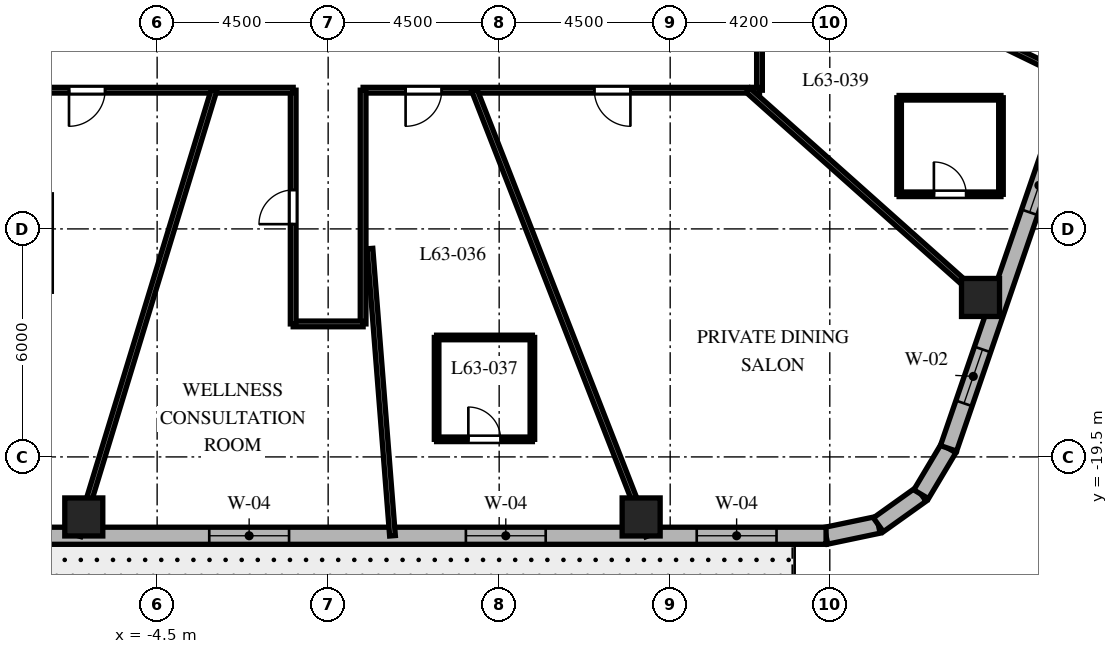
"""IFC4 building model, lengths in metres.
Left out: names, types, materials, properties, quantities, classifications, styles, units other than length and angle.
Written with IfcOpenShell. Run it as: python <this file> out.ifc"""

import sys

from ifc_helpers import new_model, si_unit, direction, frame, frame_2d, origin, origin_2d, place, context, subcontext, project, spatial, rectangle, extrude, element, fill, save


model = new_model("IFC4")
c1 = context("Model", 3, precision=1e-05, world=origin(), true_north=direction((0.0, 1.0)))
c2 = subcontext(c1, "Body", "Model", "MODEL_VIEW")
j1 = project(units=[si_unit("LENGTHUNIT", "METRE"), si_unit("PLANEANGLEUNIT", "RADIAN")], contexts=[c1])
p1 = place(None, origin())
s1 = spatial("IfcSite", under=j1, at=p1, CompositionType="ELEMENT")
p2 = place(p1, origin())
s2 = spatial("IfcBuilding", under=s1, at=p2, CompositionType="ELEMENT")
p3 = place(p2, frame((0.0, 0.0, 252.1)))
s3 = spatial("IfcBuildingStorey", under=s2, at=p3, CompositionType="ELEMENT", Elevation=252.1)
for number, where, z_axis, x_axis in (
    (1, (-6.43, -21.08, 0.0), (0.0, 0.0, 1.0), (1.0, 0.0, 0.0)),
    (2, (8.236, -21.08, 0.0), (0.0, 0.0, 1.0), (1.0, 0.0, 0.0)),
    (3, (17.166, -15.304, 0.0), (0.0, 0.0, 1.0), (1.0, 0.0, 0.0)),
):
    element("IfcColumn", number, at=place(p3, frame(where, z_axis=z_axis, x_axis=x_axis)), inside=s3, PredefinedType="COLUMN", context=c2, shape_type="SweptSolid", body=[
        extrude(rectangle(XDim=1.0, YDim=1.0, at=origin_2d()), origin(), (0.0, 0.0, 1.0), 3.8),
    ])
p4 = place(p3, frame((13.102, -21.575, 0.0), z_axis=(0.0, 0.0, 1.0), x_axis=(0.978757421505, 0.205021730188, 0.0)))
e4 = element("IfcWall", 4, at=p4, inside=s3, PredefinedType="SOLIDWALL", context=c2, shape_type="SweptSolid", body=[
    extrude(rectangle(XDim=1.406, YDim=0.45, at=frame_2d((0.703, 0.0))), origin(), (0.0, 0.0, 1.0), 3.48),
])
p5 = place(p3, frame((14.478, -21.287, 0.0), z_axis=(0.0, 0.0, 1.0), x_axis=(0.813888518617, 0.58102106611, 0.0)))
e5 = element("IfcWall", 5, at=p5, inside=s3, PredefinedType="SOLIDWALL", context=c2, shape_type="SweptSolid", body=[
    extrude(rectangle(XDim=1.383, YDim=0.45, at=frame_2d((0.691, 0.0))), origin(), (0.0, 0.0, 1.0), 3.48),
])
p6 = place(p3, frame((15.604, -20.483, 0.0), z_axis=(0.0, 0.0, 1.0), x_axis=(0.512222149036, 0.858852996756, 0.0)))
e6 = element("IfcWall", 6, at=p6, inside=s3, PredefinedType="SOLIDWALL", context=c2, shape_type="SweptSolid", body=[
    extrude(rectangle(XDim=1.406, YDim=0.45, at=frame_2d((0.703, 0.0))), origin(), (0.0, 0.0, 1.0), 3.48),
])
p7 = place(p3, frame((-11.298, -21.575, 0.0), z_axis=(0.0, 0.0, 1.0), x_axis=(1.0, 0.0, 0.0)))
e7 = element("IfcWall", 7, at=p7, inside=s3, PredefinedType="SOLIDWALL", context=c2, shape_type="SweptSolid", body=[
    extrude(rectangle(XDim=24.399, YDim=0.45, at=frame_2d((12.2, 0.0))), origin(), (0.0, 0.0, 1.0), 3.48),
])
p8 = place(p7, frame((2.55, 0.0, 0.0)))
e8 = element("IfcOpeningElement", 8, at=p8, cuts=e7, PredefinedType="OPENING", context=c2, shape_type="SweptSolid", body=[
    extrude(rectangle(XDim=1.0, YDim=2.15, at=frame_2d((0.5, 1.075))), frame((0.0, 0.235, 0.0), z_axis=(0.0, -1.0, 0.0), x_axis=(1.0, 0.0, 0.0)), (0.0, 0.0, 1.0), 0.47),
])
p9 = place(p7, frame((8.169, 0.0, 0.8)))
e9 = element("IfcOpeningElement", 9, at=p9, cuts=e7, PredefinedType="OPENING", context=c2, shape_type="SweptSolid", body=[
    extrude(rectangle(XDim=2.1, YDim=1.85, at=frame_2d((1.05, 0.925))), frame((0.0, 0.235, 0.0), z_axis=(0.0, -1.0, 0.0), x_axis=(1.0, 0.0, 0.0)), (0.0, 0.0, 1.0), 0.47),
])
p10 = place(p7, frame((14.922, 0.0, 0.8)))
e10 = element("IfcOpeningElement", 10, at=p10, cuts=e7, PredefinedType="OPENING", context=c2, shape_type="SweptSolid", body=[
    extrude(rectangle(XDim=2.1, YDim=1.85, at=frame_2d((1.05, 0.925))), frame((0.0, 0.235, 0.0), z_axis=(0.0, -1.0, 0.0), x_axis=(1.0, 0.0, 0.0)), (0.0, 0.0, 1.0), 0.47),
])
p11 = place(p7, frame((20.996, 0.0, 0.8)))
e11 = element("IfcOpeningElement", 11, at=p11, cuts=e7, PredefinedType="OPENING", context=c2, shape_type="SweptSolid", body=[
    extrude(rectangle(XDim=2.1, YDim=1.85, at=frame_2d((1.05, 0.925))), frame((0.0, 0.235, 0.0), z_axis=(0.0, -1.0, 0.0), x_axis=(1.0, 0.0, 0.0)), (0.0, 0.0, 1.0), 0.47),
])
p12 = place(p3, frame((16.324, -19.275, 0.0), z_axis=(0.0, 0.0, 1.0), x_axis=(0.325083142304, 0.945685439557, 0.0)))
e12 = element("IfcWall", 12, at=p12, inside=s3, PredefinedType="SOLIDWALL", context=c2, shape_type="SweptSolid", body=[
    extrude(rectangle(XDim=20.224, YDim=0.45, at=frame_2d((10.112, 0.0))), origin(), (0.0, 0.0, 1.0), 3.48),
])
p13 = place(p12, frame((1.253, 0.0, 0.8)))
e13 = element("IfcOpeningElement", 13, at=p13, cuts=e12, PredefinedType="OPENING", context=c2, shape_type="SweptSolid", body=[
    extrude(rectangle(XDim=1.5, YDim=1.8, at=frame_2d((0.75, 0.9))), frame((0.0, 0.235, 0.0), z_axis=(0.0, -1.0, 0.0), x_axis=(1.0, 0.0, 0.0)), (0.0, 0.0, 1.0), 0.47),
])
p14 = place(p12, frame((6.568, 0.0, 0.8)))
e14 = element("IfcOpeningElement", 14, at=p14, cuts=e12, PredefinedType="OPENING", context=c2, shape_type="SweptSolid", body=[
    extrude(rectangle(XDim=1.5, YDim=1.8, at=frame_2d((0.75, 0.9))), frame((0.0, 0.235, 0.0), z_axis=(0.0, -1.0, 0.0), x_axis=(1.0, 0.0, 0.0)), (0.0, 0.0, 1.0), 0.47),
])
p15 = place(p12, frame((12.25, 0.0, 0.8)))
e15 = element("IfcOpeningElement", 15, at=p15, cuts=e12, PredefinedType="OPENING", context=c2, shape_type="SweptSolid", body=[
    extrude(rectangle(XDim=1.5, YDim=1.8, at=frame_2d((0.75, 0.9))), frame((0.0, 0.235, 0.0), z_axis=(0.0, -1.0, 0.0), x_axis=(1.0, 0.0, 0.0)), (0.0, 0.0, 1.0), 0.47),
])
p16 = place(p12, frame((17.418, 0.0, 0.8)))
e16 = element("IfcOpeningElement", 16, at=p16, cuts=e12, PredefinedType="OPENING", context=c2, shape_type="SweptSolid", body=[
    extrude(rectangle(XDim=1.5, YDim=1.8, at=frame_2d((0.75, 0.9))), frame((0.0, 0.235, 0.0), z_axis=(0.0, -1.0, 0.0), x_axis=(1.0, 0.0, 0.0)), (0.0, 0.0, 1.0), 0.47),
])
p17 = place(p3, frame((11.35, -4.4, 0.0), z_axis=(0.0, 0.0, 1.0), x_axis=(0.0, -1.0, 0.0)))
e17 = element("IfcWall", 17, at=p17, inside=s3, PredefinedType="PARTITIONING", context=c2, shape_type="SweptSolid", body=[
    extrude(rectangle(XDim=5.45, YDim=0.15, at=frame_2d((2.725, 0.0))), origin(), (0.0, 0.0, 1.0), 2.97),
])
p18 = place(p17, frame((2.694, 0.0, 0.0)))
e18 = element("IfcOpeningElement", 18, at=p18, cuts=e17, PredefinedType="OPENING", context=c2, shape_type="SweptSolid", body=[
    extrude(rectangle(XDim=0.95, YDim=2.03, at=frame_2d((0.475, 1.015))), frame((0.0, 0.085, 0.0), z_axis=(0.0, -1.0, 0.0), x_axis=(1.0, 0.0, 0.0)), (0.0, 0.0, 1.0), 0.17),
])
p19 = place(p3, frame((11.35, -9.85, 0.0), z_axis=(0.0, 0.0, 1.0), x_axis=(-1.0, 0.0, 0.0)))
e19 = element("IfcWall", 19, at=p19, inside=s3, PredefinedType="PARTITIONING", context=c2, shape_type="SweptSolid", body=[
    extrude(rectangle(XDim=10.43, YDim=0.15, at=frame_2d((5.215, 0.0))), origin(), (0.0, 0.0, 1.0), 2.97),
])
p20 = place(p19, frame((8.362, 0.0, 0.0)))
e20 = element("IfcOpeningElement", 20, at=p20, cuts=e19, PredefinedType="OPENING", context=c2, shape_type="SweptSolid", body=[
    extrude(rectangle(XDim=0.95, YDim=2.03, at=frame_2d((0.475, 1.015))), frame((0.0, 0.085, 0.0), z_axis=(0.0, -1.0, 0.0), x_axis=(1.0, 0.0, 0.0)), (0.0, 0.0, 1.0), 0.17),
])
p21 = place(p19, frame((3.396, 0.0, 0.0)))
e21 = element("IfcOpeningElement", 21, at=p21, cuts=e19, PredefinedType="OPENING", context=c2, shape_type="SweptSolid", body=[
    extrude(rectangle(XDim=0.95, YDim=2.03, at=frame_2d((0.475, 1.015))), frame((0.0, 0.085, 0.0), z_axis=(0.0, -1.0, 0.0), x_axis=(1.0, 0.0, 0.0)), (0.0, 0.0, 1.0), 0.17),
])
p22 = place(p3, frame((0.92, -9.85, 0.0), z_axis=(0.0, 0.0, 1.0), x_axis=(0.0, -1.0, 0.0)))
e22 = element("IfcWall", 22, at=p22, inside=s3, PredefinedType="PARTITIONING", context=c2, shape_type="SweptSolid", body=[
    extrude(rectangle(XDim=6.15, YDim=0.15, at=frame_2d((3.075, 0.0))), origin(), (0.0, 0.0, 1.0), 3.006),
])
p23 = place(p3, frame((0.92, -16.0, 0.0), z_axis=(0.0, 0.0, 1.0), x_axis=(-1.0, 0.0, 0.0)))
e23 = element("IfcWall", 23, at=p23, inside=s3, PredefinedType="PARTITIONING", context=c2, shape_type="SweptSolid", body=[
    extrude(rectangle(XDim=1.84, YDim=0.15, at=frame_2d((0.92, 0.0))), origin(), (0.0, 0.0, 1.0), 3.48),
])
p24 = place(p3, frame((-0.92, -16.0, 0.0), z_axis=(0.0, 0.0, 1.0), x_axis=(0.0, 1.0, 0.0)))
e24 = element("IfcWall", 24, at=p24, inside=s3, PredefinedType="PARTITIONING", context=c2, shape_type="SweptSolid", body=[
    extrude(rectangle(XDim=6.15, YDim=0.15, at=frame_2d((3.075, 0.0))), origin(), (0.0, 0.0, 1.0), 3.006),
])
p25 = place(p24, frame((2.625, 0.0, 0.0)))
e25 = element("IfcOpeningElement", 25, at=p25, cuts=e24, PredefinedType="OPENING", context=c2, shape_type="SweptSolid", body=[
    extrude(rectangle(XDim=0.9, YDim=2.03, at=frame_2d((0.45, 1.015))), frame((0.0, 0.085, 0.0), z_axis=(0.0, -1.0, 0.0), x_axis=(1.0, 0.0, 0.0)), (0.0, 0.0, 1.0), 0.17),
])
p26 = place(p3, frame((-0.92, -9.85, 0.0), z_axis=(0.0, 0.0, 1.0), x_axis=(-1.0, 0.0, 0.0)))
e26 = element("IfcWall", 26, at=p26, inside=s3, PredefinedType="PARTITIONING", context=c2, shape_type="SweptSolid", body=[
    extrude(rectangle(XDim=10.43, YDim=0.15, at=frame_2d((5.215, 0.0))), origin(), (0.0, 0.0, 1.0), 2.97),
])
p27 = place(p26, frame((4.949, 0.0, 0.0)))
e27 = element("IfcOpeningElement", 27, at=p27, cuts=e26, PredefinedType="OPENING", context=c2, shape_type="SweptSolid", body=[
    extrude(rectangle(XDim=0.95, YDim=2.03, at=frame_2d((0.475, 1.015))), frame((0.0, 0.085, 0.0), z_axis=(0.0, -1.0, 0.0), x_axis=(1.0, 0.0, 0.0)), (0.0, 0.0, 1.0), 0.17),
])
p28 = place(p3, frame((-3.004, -9.85, 0.0), z_axis=(0.0, 0.0, 1.0), x_axis=(-0.291775760688, -0.956486751333, 0.0)))
e28 = element("IfcWall", 28, at=p28, inside=s3, PredefinedType="PARTITIONING", context=c2, shape_type="SweptSolid", body=[
    extrude(rectangle(XDim=12.258, YDim=0.15, at=frame_2d((6.129, 0.0))), origin(), (0.0, 0.0, 1.0), 2.72),
])
p29 = place(p3, frame((1.1, -14.018, 0.0), z_axis=(0.0, 0.0, 1.0), x_axis=(0.078228275349, -0.996935472804, 0.0)))
e29 = element("IfcWall", 29, at=p29, inside=s3, PredefinedType="PARTITIONING", context=c2, shape_type="SweptSolid", body=[
    extrude(rectangle(XDim=7.581, YDim=0.15, at=frame_2d((3.79, 0.0))), origin(), (0.0, 0.0, 1.0), 2.72),
])
p30 = place(p3, frame((3.848, -9.85, 0.0), z_axis=(0.0, 0.0, 1.0), x_axis=(0.363921778212, -0.931429513889, 0.0)))
e30 = element("IfcWall", 30, at=p30, inside=s3, PredefinedType="PARTITIONING", context=c2, shape_type="SweptSolid", body=[
    extrude(rectangle(XDim=12.588, YDim=0.15, at=frame_2d((6.294, 0.0))), origin(), (0.0, 0.0, 1.0), 2.72),
])
p31 = place(p3, frame((11.048, -9.85, 0.0), z_axis=(0.0, 0.0, 1.0), x_axis=(0.746444434655, -0.665447748492, 0.0)))
e31 = element("IfcWall", 31, at=p31, inside=s3, PredefinedType="PARTITIONING", context=c2, shape_type="SweptSolid", body=[
    extrude(rectangle(XDim=8.732, YDim=0.15, at=frame_2d((4.366, 0.0))), origin(), (0.0, 0.0, 1.0), 2.72),
])
p32 = place(p3, frame((11.35, -5.528, 0.0), z_axis=(0.0, 0.0, 1.0), x_axis=(0.899038669565, -0.437869239188, 0.0)))
e32 = element("IfcWall", 32, at=p32, inside=s3, PredefinedType="PARTITIONING", context=c2, shape_type="SweptSolid", body=[
    extrude(rectangle(XDim=9.242, YDim=0.15, at=frame_2d((4.621, 0.0))), origin(), (0.0, 0.0, 1.0), 2.72),
])
p33 = place(p3, frame((2.854, -19.037, 0.0), z_axis=(0.0, 0.0, 1.0), x_axis=(1.0, 0.0, 0.0)))
e33 = element("IfcWall", 33, at=p33, inside=s3, PredefinedType="PARTITIONING", context=c2, shape_type="SweptSolid", body=[
    extrude(rectangle(XDim=2.52, YDim=0.12, at=frame_2d((1.26, 0.0))), origin(), (0.0, 0.0, 1.0), 3.48),
])
p34 = place(p33, frame((0.835, 0.0, 0.0)))
e34 = element("IfcOpeningElement", 34, at=p34, cuts=e33, PredefinedType="OPENING", context=c2, shape_type="SweptSolid", body=[
    extrude(rectangle(XDim=0.85, YDim=2.03, at=frame_2d((0.425, 1.015))), frame((0.0, 0.07, 0.0), z_axis=(0.0, -1.0, 0.0), x_axis=(1.0, 0.0, 0.0)), (0.0, 0.0, 1.0), 0.14),
])
p35 = place(p3, frame((5.374, -19.037, 0.0), z_axis=(0.0, 0.0, 1.0), x_axis=(0.0, 1.0, 0.0)))
e35 = element("IfcWall", 35, at=p35, inside=s3, PredefinedType="PARTITIONING", context=c2, shape_type="SweptSolid", body=[
    extrude(rectangle(XDim=2.68, YDim=0.12, at=frame_2d((1.34, 0.0))), origin(), (0.0, 0.0, 1.0), 2.92),
])
p36 = place(p3, frame((5.374, -16.357, 0.0), z_axis=(0.0, 0.0, 1.0), x_axis=(-1.0, 0.0, 0.0)))
e36 = element("IfcWall", 36, at=p36, inside=s3, PredefinedType="PARTITIONING", context=c2, shape_type="SweptSolid", body=[
    extrude(rectangle(XDim=2.52, YDim=0.12, at=frame_2d((1.26, 0.0))), origin(), (0.0, 0.0, 1.0), 3.48),
])
p37 = place(p3, frame((2.854, -16.357, 0.0), z_axis=(0.0, 0.0, 1.0), x_axis=(0.0, -1.0, 0.0)))
e37 = element("IfcWall", 37, at=p37, inside=s3, PredefinedType="PARTITIONING", context=c2, shape_type="SweptSolid", body=[
    extrude(rectangle(XDim=2.68, YDim=0.12, at=frame_2d((1.34, 0.0))), origin(), (0.0, 0.0, 1.0), 2.92),
])
p38 = place(p3, frame((15.024, -12.589, 0.0), z_axis=(0.0, 0.0, 1.0), x_axis=(1.0, 0.0, 0.0)))
e38 = element("IfcWall", 38, at=p38, inside=s3, PredefinedType="PARTITIONING", context=c2, shape_type="SweptSolid", body=[
    extrude(rectangle(XDim=2.68, YDim=0.12, at=frame_2d((1.34, 0.0))), origin(), (0.0, 0.0, 1.0), 3.48),
])
p39 = place(p38, frame((0.915, 0.0, 0.0)))
e39 = element("IfcOpeningElement", 39, at=p39, cuts=e38, PredefinedType="OPENING", context=c2, shape_type="SweptSolid", body=[
    extrude(rectangle(XDim=0.85, YDim=2.03, at=frame_2d((0.425, 1.015))), frame((0.0, 0.07, 0.0), z_axis=(0.0, -1.0, 0.0), x_axis=(1.0, 0.0, 0.0)), (0.0, 0.0, 1.0), 0.14),
])
p40 = place(p3, frame((17.704, -12.589, 0.0), z_axis=(0.0, 0.0, 1.0), x_axis=(0.0, 1.0, 0.0)))
e40 = element("IfcWall", 40, at=p40, inside=s3, PredefinedType="PARTITIONING", context=c2, shape_type="SweptSolid", body=[
    extrude(rectangle(XDim=2.54, YDim=0.12, at=frame_2d((1.27, 0.0))), origin(), (0.0, 0.0, 1.0), 3.48),
])
p41 = place(p3, frame((17.704, -10.049, 0.0), z_axis=(0.0, 0.0, 1.0), x_axis=(-1.0, 0.0, 0.0)))
e41 = element("IfcWall", 41, at=p41, inside=s3, PredefinedType="PARTITIONING", context=c2, shape_type="SweptSolid", body=[
    extrude(rectangle(XDim=2.68, YDim=0.12, at=frame_2d((1.34, 0.0))), origin(), (0.0, 0.0, 1.0), 3.052),
])
p42 = place(p3, frame((15.024, -10.049, 0.0), z_axis=(0.0, 0.0, 1.0), x_axis=(0.0, -1.0, 0.0)))
e42 = element("IfcWall", 42, at=p42, inside=s3, PredefinedType="PARTITIONING", context=c2, shape_type="SweptSolid", body=[
    extrude(rectangle(XDim=2.54, YDim=0.12, at=frame_2d((1.27, 0.0))), origin(), (0.0, 0.0, 1.0), 3.052),
])
p43 = place(p9, origin())
e43 = element("IfcWindow", 43, at=p43, inside=s3, PartitioningType="SINGLE_PANEL", PredefinedType="WINDOW", context=c2, shape_type="SweptSolid", body=[
    extrude(rectangle(XDim=2.1, YDim=1.85, at=frame_2d((1.05, 0.925))), frame((0.0, 0.03, 0.0), z_axis=(0.0, -1.0, 0.0), x_axis=(1.0, 0.0, 0.0)), (0.0, 0.0, 1.0), 0.06),
])
fill(e9, e43)
p44 = place(p10, origin())
e44 = element("IfcWindow", 44, at=p44, inside=s3, PartitioningType="SINGLE_PANEL", PredefinedType="WINDOW", context=c2, shape_type="SweptSolid", body=[
    extrude(rectangle(XDim=2.1, YDim=1.85, at=frame_2d((1.05, 0.925))), frame((0.0, 0.03, 0.0), z_axis=(0.0, -1.0, 0.0), x_axis=(1.0, 0.0, 0.0)), (0.0, 0.0, 1.0), 0.06),
])
fill(e10, e44)
p45 = place(p11, origin())
e45 = element("IfcWindow", 45, at=p45, inside=s3, PartitioningType="SINGLE_PANEL", PredefinedType="WINDOW", context=c2, shape_type="SweptSolid", body=[
    extrude(rectangle(XDim=2.1, YDim=1.85, at=frame_2d((1.05, 0.925))), frame((0.0, 0.03, 0.0), z_axis=(0.0, -1.0, 0.0), x_axis=(1.0, 0.0, 0.0)), (0.0, 0.0, 1.0), 0.06),
])
fill(e11, e45)
p46 = place(p13, origin())
e46 = element("IfcWindow", 46, at=p46, inside=s3, PartitioningType="SINGLE_PANEL", PredefinedType="WINDOW", context=c2, shape_type="SweptSolid", body=[
    extrude(rectangle(XDim=1.5, YDim=1.8, at=frame_2d((0.75, 0.9))), frame((0.0, 0.03, 0.0), z_axis=(0.0, -1.0, 0.0), x_axis=(1.0, 0.0, 0.0)), (0.0, 0.0, 1.0), 0.06),
])
fill(e13, e46)
p47 = place(p14, origin())
e47 = element("IfcWindow", 47, at=p47, inside=s3, PartitioningType="SINGLE_PANEL", PredefinedType="WINDOW", context=c2, shape_type="SweptSolid", body=[
    extrude(rectangle(XDim=1.5, YDim=1.8, at=frame_2d((0.75, 0.9))), frame((0.0, 0.03, 0.0), z_axis=(0.0, -1.0, 0.0), x_axis=(1.0, 0.0, 0.0)), (0.0, 0.0, 1.0), 0.06),
])
fill(e14, e47)
p48 = place(p27, origin())
e48 = element("IfcDoor", 48, at=p48, inside=s3, OperationType="SINGLE_SWING_RIGHT", PredefinedType="DOOR", context=c2, shape_type="SweptSolid", body=[
    extrude(rectangle(XDim=0.95, YDim=2.03, at=frame_2d((0.475, 1.015))), frame((0.0, 0.025, 0.0), z_axis=(0.0, -1.0, 0.0), x_axis=(1.0, 0.0, 0.0)), (0.0, 0.0, 1.0), 0.05),
])
fill(e27, e48)
p49 = place(p25, origin())
e49 = element("IfcDoor", 49, at=p49, inside=s3, OperationType="SINGLE_SWING_LEFT", PredefinedType="DOOR", context=c2, shape_type="SweptSolid", body=[
    extrude(rectangle(XDim=0.9, YDim=2.03, at=frame_2d((0.45, 1.015))), frame((0.0, 0.025, 0.0), z_axis=(0.0, -1.0, 0.0), x_axis=(1.0, 0.0, 0.0)), (0.0, 0.0, 1.0), 0.05),
])
fill(e25, e49)
p50 = place(p20, origin())
e50 = element("IfcDoor", 50, at=p50, inside=s3, OperationType="SINGLE_SWING_RIGHT", PredefinedType="DOOR", context=c2, shape_type="SweptSolid", body=[
    extrude(rectangle(XDim=0.95, YDim=2.03, at=frame_2d((0.475, 1.015))), frame((0.0, 0.025, 0.0), z_axis=(0.0, -1.0, 0.0), x_axis=(1.0, 0.0, 0.0)), (0.0, 0.0, 1.0), 0.05),
])
fill(e20, e50)
p51 = place(p34, origin())
e51 = element("IfcDoor", 51, at=p51, inside=s3, OperationType="SINGLE_SWING_LEFT", PredefinedType="DOOR", context=c2, shape_type="SweptSolid", body=[
    extrude(rectangle(XDim=0.85, YDim=2.03, at=frame_2d((0.425, 1.015))), frame((0.0, 0.025, 0.0), z_axis=(0.0, -1.0, 0.0), x_axis=(1.0, 0.0, 0.0)), (0.0, 0.0, 1.0), 0.05),
])
fill(e34, e51)
p52 = place(p21, origin())
e52 = element("IfcDoor", 52, at=p52, inside=s3, OperationType="SINGLE_SWING_LEFT", PredefinedType="DOOR", context=c2, shape_type="SweptSolid", body=[
    extrude(rectangle(XDim=0.95, YDim=2.03, at=frame_2d((0.475, 1.015))), frame((0.0, 0.025, 0.0), z_axis=(0.0, -1.0, 0.0), x_axis=(1.0, 0.0, 0.0)), (0.0, 0.0, 1.0), 0.05),
])
fill(e21, e52)
p53 = place(p39, origin())
e53 = element("IfcDoor", 53, at=p53, inside=s3, OperationType="SINGLE_SWING_LEFT", PredefinedType="DOOR", context=c2, shape_type="SweptSolid", body=[
    extrude(rectangle(XDim=0.85, YDim=2.03, at=frame_2d((0.425, 1.015))), frame((0.0, 0.025, 0.0), z_axis=(0.0, -1.0, 0.0), x_axis=(1.0, 0.0, 0.0)), (0.0, 0.0, 1.0), 0.05),
])
fill(e39, e53)
save(model, sys.argv[1])
